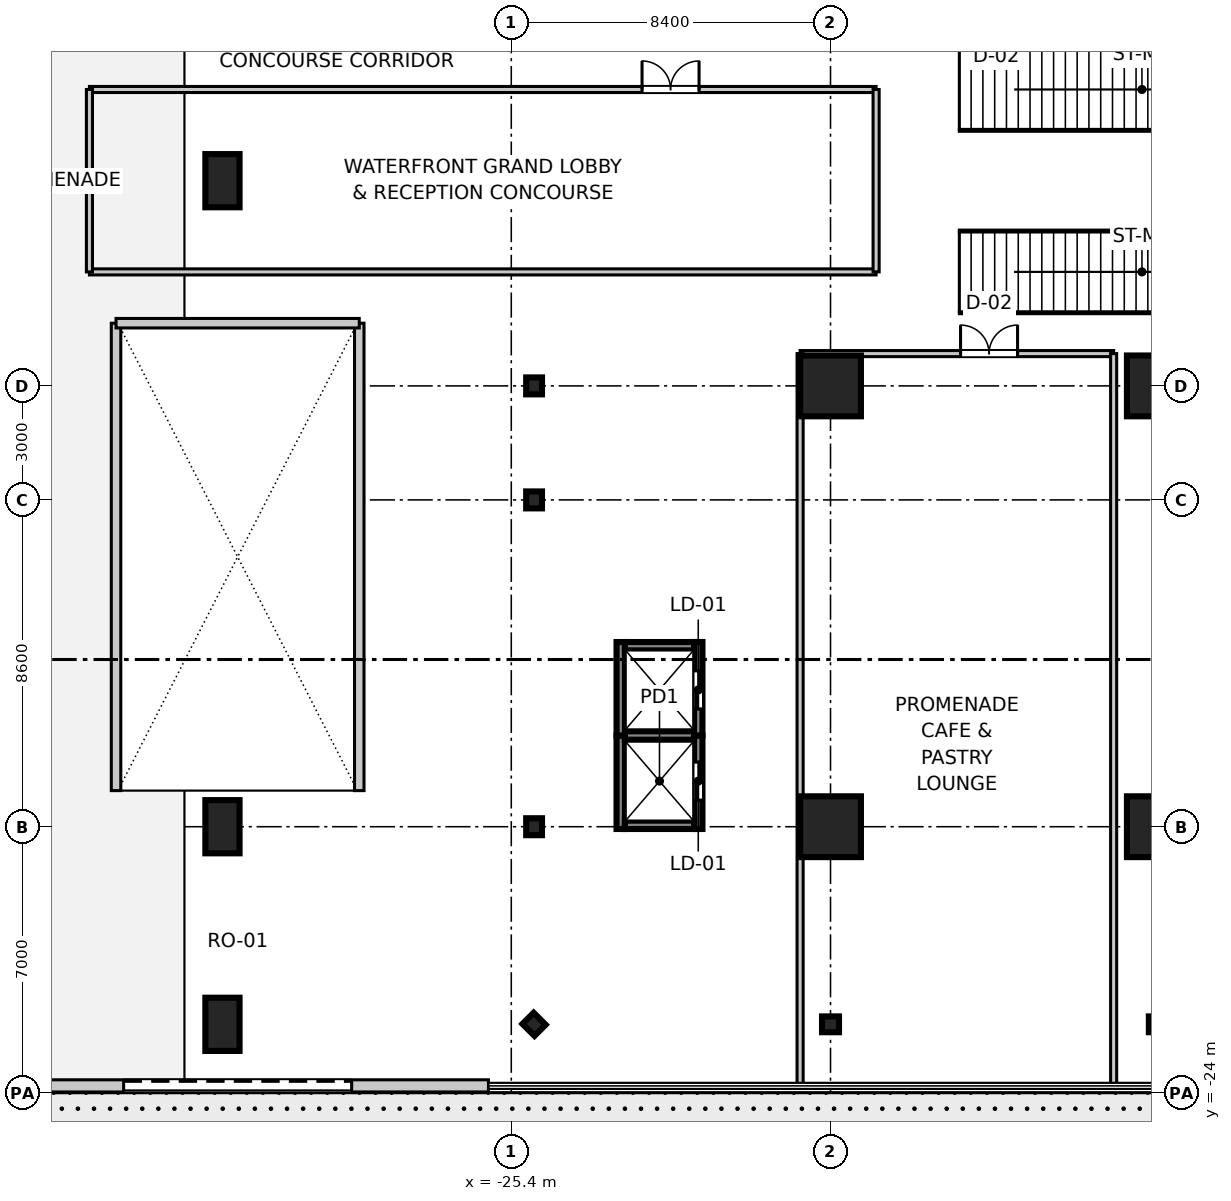
"""IFC4 building model, lengths in metres.
Left out: names, types, materials, properties, quantities, classifications, styles, units other than length and angle.
Written with IfcOpenShell. Run it as: python <this file> out.ifc"""

import sys

from ifc_helpers import new_model, si_unit, direction, frame, frame_2d, origin, origin_2d, place, context, subcontext, project, spatial, rectangle, i_section, extrude, source, transform, mapped, element, fill, save


model = new_model("IFC4")
c1 = context("Model", 3, precision=1e-05, world=origin(), true_north=direction((0.0, 1.0)))
c2 = subcontext(c1, "Body", "Model", "MODEL_VIEW")
j1 = project(units=[si_unit("LENGTHUNIT", "METRE"), si_unit("PLANEANGLEUNIT", "RADIAN")], contexts=[c1])
p1 = place(None, origin())
s1 = spatial("IfcSite", under=j1, at=p1, CompositionType="ELEMENT")
p2 = place(p1, origin())
s2 = spatial("IfcBuilding", under=s1, at=p2, CompositionType="ELEMENT")
p3 = place(p2, origin())
s3 = spatial("IfcBuildingStorey", under=s2, at=p3, CompositionType="ELEMENT", Elevation=0.0)
m1 = source(origin(), c2, "Body", "SweptSolid", [
    extrude(rectangle(XDim=1.6, YDim=1.6, at=origin_2d()), origin(), (0.0, 0.0, 1.0), 5.355),
])
for number, where, z_axis, x_axis in (
    (1, (-17.0, -17.0, 0.0), (0.0, 0.0, 1.0), (1.0, 0.0, 0.0)),
    (2, (-17.0, -5.4, 0.0), (0.0, 0.0, 1.0), (1.0, 0.0, 0.0)),
    (3, (-8.4, -17.0, 0.0), (0.0, 0.0, 1.0), (1.0, 0.0, 0.0)),
    (4, (-8.4, -5.4, 0.0), (0.0, 0.0, 1.0), (1.0, 0.0, 0.0)),
):
    element("IfcColumn", number, at=place(p3, frame(where, z_axis=z_axis, x_axis=x_axis)), inside=s3, PredefinedType="COLUMN", context=c2, shape_type="MappedRepresentation", body=[
        mapped(m1, transform((0.0, 0.0, 0.0), scale=1.0)),
    ])
m2 = source(origin(), c2, "Body", "SweptSolid", [
    extrude(rectangle(XDim=0.9, YDim=1.4, at=origin_2d()), origin(), (0.0, 0.0, 1.0), 5.355),
])
for number, where, z_axis, x_axis in (
    (5, (-33.0, -22.2, 0.0), (0.0, 0.0, 1.0), (1.0, 0.0, 0.0)),
    (6, (-33.0, -17.0, 0.0), (0.0, 0.0, 1.0), (1.0, 0.0, 0.0)),
    (7, (-33.0, 0.0, 0.0), (0.0, 0.0, 1.0), (1.0, 0.0, 0.0)),
):
    element("IfcColumn", number, at=place(p3, frame(where, z_axis=z_axis, x_axis=x_axis)), inside=s3, PredefinedType="PILASTER", context=c2, shape_type="MappedRepresentation", body=[
        mapped(m2, transform((0.0, 0.0, 0.0), scale=1.0)),
    ])
m3 = source(origin(), c2, "Body", "SweptSolid", [
    extrude(i_section(OverallWidth=0.416, OverallDepth=0.446, WebThickness=0.025, FlangeThickness=0.04, at=origin_2d()), origin(), (0.0, 0.0, 1.0), 5.355),
])
for number, where, z_axis, x_axis in (
    (8, (-24.8, -17.0, 0.0), (0.0, 0.0, 1.0), (1.0, 0.0, 0.0)),
    (9, (-24.8, -8.4, 0.0), (0.0, 0.0, 1.0), (1.0, 0.0, 0.0)),
    (10, (-24.8, -5.4, 0.0), (0.0, 0.0, 1.0), (1.0, 0.0, 0.0)),
    (11, (-17.0, -22.2, 0.0), (0.0, 0.0, 1.0), (0.0, 1.0, 0.0)),
    (12, (-8.4, -22.2, 0.0), (0.0, 0.0, 1.0), (0.0, 1.0, 0.0)),
    (13, (-24.8, -22.2, 0.0), (0.0, 0.0, 1.0), (0.707, 0.707, 0.0)),
):
    element("IfcColumn", number, at=place(p3, frame(where, z_axis=z_axis, x_axis=x_axis)), inside=s3, PredefinedType="COLUMN", context=c2, shape_type="MappedRepresentation", body=[
        mapped(m3, transform((0.0, 0.0, 0.0), scale=1.0)),
    ])
m4 = source(origin(), c2, "Body", "SweptSolid", [
    extrude(rectangle(XDim=2.46, YDim=0.22, at=frame_2d((1.23, 0.0))), origin(), (0.0, 0.0, 1.0), 5.08),
])
p4 = place(p3, frame((-22.52, -17.06, 0.0), z_axis=(0.0, 0.0, 1.0), x_axis=(0.0, 1.0, 0.0)))
e14 = element("IfcWall", 14, at=p4, inside=s3, PredefinedType="SHEAR", context=c2, shape_type="MappedRepresentation", body=[
    mapped(m4, transform((0.0, 0.0, 0.0), scale=1.0)),
])
p5 = place(p3, frame((-20.48, -17.06, 0.0), z_axis=(0.0, 0.0, 1.0), x_axis=(0.0, 1.0, 0.0)))
e15 = element("IfcWall", 15, at=p5, inside=s3, PredefinedType="SHEAR", context=c2, shape_type="MappedRepresentation", body=[
    mapped(m4, transform((0.0, 0.0, 0.0), scale=1.0)),
])
p6 = place(p5, frame((0.76, 0.0, 0.0)))
e16 = element("IfcOpeningElement", 16, at=p6, cuts=e15, PredefinedType="OPENING", context=c2, shape_type="SweptSolid", body=[
    extrude(rectangle(XDim=1.0, YDim=2.2, at=frame_2d((0.5, 1.1))), frame((0.0, 0.12, 0.0), z_axis=(0.0, -1.0, 0.0), x_axis=(1.0, 0.0, 0.0)), (0.0, 0.0, 1.0), 0.24),
])
m5 = source(origin(), c2, "Body", "SweptSolid", [
    extrude(rectangle(XDim=1.82, YDim=0.22, at=frame_2d((0.91, 0.0))), origin(), (0.0, 0.0, 1.0), 5.08),
])
p7 = place(p3, frame((-22.41, -16.95, 0.0), z_axis=(0.0, 0.0, 1.0), x_axis=(1.0, 0.0, 0.0)))
e17 = element("IfcWall", 17, at=p7, inside=s3, PredefinedType="SHEAR", context=c2, shape_type="MappedRepresentation", body=[
    mapped(m5, transform((0.0, 0.0, 0.0), scale=1.0)),
])
m6 = source(origin(), c2, "Body", "SweptSolid", [
    extrude(rectangle(XDim=1.82, YDim=0.22, at=frame_2d((0.91, 0.0))), origin(), (0.0, 0.0, 1.0), 5.4),
])
p8 = place(p3, frame((-22.41, -14.6, 0.0), z_axis=(0.0, 0.0, 1.0), x_axis=(1.0, 0.0, 0.0)))
e18 = element("IfcWall", 18, at=p8, inside=s3, PredefinedType="SHEAR", context=c2, shape_type="MappedRepresentation", body=[
    mapped(m6, transform((0.0, 0.0, 0.0), scale=1.0)),
])
m7 = source(origin(), c2, "Body", "SweptSolid", [
    extrude(rectangle(XDim=2.46, YDim=0.22, at=frame_2d((1.23, 0.0))), origin(), (0.0, 0.0, 1.0), 5.08),
])
p9 = place(p3, frame((-22.52, -14.6, 0.0), z_axis=(0.0, 0.0, 1.0), x_axis=(0.0, 1.0, 0.0)))
e19 = element("IfcWall", 19, at=p9, inside=s3, PredefinedType="SHEAR", context=c2, shape_type="MappedRepresentation", body=[
    mapped(m7, transform((0.0, 0.0, 0.0), scale=1.0)),
])
p10 = place(p3, frame((-20.48, -14.6, 0.0), z_axis=(0.0, 0.0, 1.0), x_axis=(0.0, 1.0, 0.0)))
e20 = element("IfcWall", 20, at=p10, inside=s3, PredefinedType="SHEAR", context=c2, shape_type="MappedRepresentation", body=[
    mapped(m7, transform((0.0, 0.0, 0.0), scale=1.0)),
])
p11 = place(p10, frame((0.7, 0.0, 0.0)))
e21 = element("IfcOpeningElement", 21, at=p11, cuts=e20, PredefinedType="OPENING", context=c2, shape_type="SweptSolid", body=[
    extrude(rectangle(XDim=1.0, YDim=2.2, at=frame_2d((0.5, 1.1))), frame((0.0, 0.12, 0.0), z_axis=(0.0, -1.0, 0.0), x_axis=(1.0, 0.0, 0.0)), (0.0, 0.0, 1.0), 0.24),
])
p12 = place(p3, frame((-22.41, -12.25, 0.0), z_axis=(0.0, 0.0, 1.0), x_axis=(1.0, 0.0, 0.0)))
e22 = element("IfcWall", 22, at=p12, inside=s3, PredefinedType="SHEAR", context=c2, shape_type="MappedRepresentation", body=[
    mapped(m5, transform((0.0, 0.0, 0.0), scale=1.0)),
])
m8 = source(origin(), c2, "Body", "SweptSolid", [
    extrude(rectangle(XDim=12.3, YDim=0.25, at=frame_2d((6.15, 0.0))), origin(), (0.0, 0.0, 1.0), 1.3),
])
for number, where, z_axis, x_axis in (
    (23, (-35.8, -16.05, 0.0), (0.0, 0.0, 1.0), (0.0, 1.0, 0.0)),
    (24, (-29.4, -16.05, 0.0), (0.0, 0.0, 1.0), (0.0, 1.0, 0.0)),
):
    element("IfcWall", number, at=place(p3, frame(where, z_axis=z_axis, x_axis=x_axis)), inside=s3, PredefinedType="PARTITIONING", context=c2, shape_type="MappedRepresentation", body=[
        mapped(m8, transform((0.0, 0.0, 0.0), scale=1.0)),
    ])
m9 = source(origin(), c2, "Body", "SweptSolid", [
    extrude(rectangle(XDim=6.4, YDim=0.25, at=frame_2d((3.2, 0.0))), origin(), (0.0, 0.0, 1.0), 1.3),
])
p13 = place(p3, frame((-35.8, -3.75, 0.0), z_axis=(0.0, 0.0, 1.0), x_axis=(1.0, 0.0, 0.0)))
e25 = element("IfcWall", 25, at=p13, inside=s3, PredefinedType="PARTITIONING", context=c2, shape_type="MappedRepresentation", body=[
    mapped(m9, transform((0.0, 0.0, 0.0), scale=1.0)),
])
m10 = source(origin(), c2, "Body", "SweptSolid", [
    extrude(rectangle(XDim=11.82, YDim=0.32, at=frame_2d((5.91, 0.0))), origin(), (0.0, 0.0, 1.0), 5.08),
])
p14 = place(p3, frame((-37.82, -23.82, 0.0), z_axis=(0.0, 0.0, 1.0), x_axis=(1.0, 0.0, 0.0)))
e26 = element("IfcWall", 26, at=p14, inside=s3, PredefinedType="STANDARD", context=c2, shape_type="MappedRepresentation", body=[
    mapped(m10, transform((0.0, 0.0, 0.0), scale=1.0)),
])
p15 = place(p14, frame((2.22, 0.0, 0.0)))
e27 = element("IfcOpeningElement", 27, at=p15, cuts=e26, PredefinedType="OPENING", context=c2, shape_type="SweptSolid", body=[
    extrude(rectangle(XDim=6.0, YDim=3.4, at=frame_2d((3.0, 1.7))), frame((0.0, 0.17, 0.0), z_axis=(0.0, -1.0, 0.0), x_axis=(1.0, 0.0, 0.0)), (0.0, 0.0, 1.0), 0.34),
])
m11 = source(origin(), c2, "Body", "SweptSolid", [
    extrude(rectangle(XDim=20.7, YDim=0.16, at=frame_2d((10.35, 0.0))), origin(), (0.0, 0.0, 1.0), 3.4),
])
p16 = place(p3, frame((-36.5, -2.4, 0.0), z_axis=(0.0, 0.0, 1.0), x_axis=(1.0, 0.0, 0.0)))
e28 = element("IfcWall", 28, at=p16, inside=s3, PredefinedType="PARTITIONING", context=c2, shape_type="MappedRepresentation", body=[
    mapped(m11, transform((0.0, 0.0, 0.0), scale=1.0)),
])
p17 = place(p3, frame((-36.5, 2.4, 0.0), z_axis=(0.0, 0.0, 1.0), x_axis=(1.0, 0.0, 0.0)))
e29 = element("IfcWall", 29, at=p17, inside=s3, PredefinedType="PARTITIONING", context=c2, shape_type="MappedRepresentation", body=[
    mapped(m11, transform((0.0, 0.0, 0.0), scale=1.0)),
])
p18 = place(p17, frame((14.541, 0.0, 0.0)))
e30 = element("IfcOpeningElement", 30, at=p18, cuts=e29, PredefinedType="OPENING", context=c2, shape_type="SweptSolid", body=[
    extrude(rectangle(XDim=1.5, YDim=2.15, at=frame_2d((0.75, 1.075))), frame((0.0, 0.09, 0.0), z_axis=(0.0, -1.0, 0.0), x_axis=(1.0, 0.0, 0.0)), (0.0, 0.0, 1.0), 0.18),
])
m12 = source(origin(), c2, "Body", "SweptSolid", [
    extrude(rectangle(XDim=4.8, YDim=0.16, at=frame_2d((2.4, 0.0))), origin(), (0.0, 0.0, 1.0), 3.4),
])
for number, where, z_axis, x_axis in (
    (31, (-36.5, -2.4, 0.0), (0.0, 0.0, 1.0), (0.0, 1.0, 0.0)),
    (32, (-15.8, -2.4, 0.0), (0.0, 0.0, 1.0), (0.0, 1.0, 0.0)),
):
    element("IfcWall", number, at=place(p3, frame(where, z_axis=z_axis, x_axis=x_axis)), inside=s3, PredefinedType="PARTITIONING", context=c2, shape_type="MappedRepresentation", body=[
        mapped(m12, transform((0.0, 0.0, 0.0), scale=1.0)),
    ])
m13 = source(origin(), c2, "Body", "SweptSolid", [
    extrude(rectangle(XDim=8.25, YDim=0.16, at=frame_2d((4.125, 0.0))), origin(), (0.0, 0.0, 1.0), 3.4),
])
p19 = place(p3, frame((-17.8, -4.55, 0.0), z_axis=(0.0, 0.0, 1.0), x_axis=(1.0, 0.0, 0.0)))
e33 = element("IfcWall", 33, at=p19, inside=s3, PredefinedType="PARTITIONING", context=c2, shape_type="MappedRepresentation", body=[
    mapped(m13, transform((0.0, 0.0, 0.0), scale=1.0)),
])
p20 = place(p19, frame((4.222, 0.0, 0.0)))
e34 = element("IfcOpeningElement", 34, at=p20, cuts=e33, PredefinedType="OPENING", context=c2, shape_type="SweptSolid", body=[
    extrude(rectangle(XDim=1.5, YDim=2.15, at=frame_2d((0.75, 1.075))), frame((0.0, 0.09, 0.0), z_axis=(0.0, -1.0, 0.0), x_axis=(1.0, 0.0, 0.0)), (0.0, 0.0, 1.0), 0.18),
])
m14 = source(origin(), c2, "Body", "SweptSolid", [
    extrude(rectangle(XDim=19.21, YDim=0.16, at=frame_2d((9.605, 0.0))), origin(), (0.0, 0.0, 1.0), 3.4),
])
for number, where, z_axis, x_axis in (
    (35, (-17.8, -23.76, 0.0), (0.0, 0.0, 1.0), (0.0, 1.0, 0.0)),
    (36, (-9.55, -23.76, 0.0), (0.0, 0.0, 1.0), (0.0, 1.0, 0.0)),
):
    element("IfcWall", number, at=place(p3, frame(where, z_axis=z_axis, x_axis=x_axis)), inside=s3, PredefinedType="PARTITIONING", context=c2, shape_type="MappedRepresentation", body=[
        mapped(m14, transform((0.0, 0.0, 0.0), scale=1.0)),
    ])
m15 = source(origin(), c2, "Body", "SweptSolid", [
    extrude(rectangle(XDim=1.0, YDim=2.2, at=frame_2d((0.5, 1.1))), frame((0.0, 0.025, 0.0), z_axis=(0.0, -1.0, 0.0), x_axis=(1.0, 0.0, 0.0)), (0.0, 0.0, 1.0), 0.05),
])
p21 = place(p6, frame((1.0, 0.0, 0.0), z_axis=(0.0, 0.0, 1.0), x_axis=(-1.0, 0.0, 0.0)))
e37 = element("IfcDoor", 37, at=p21, inside=s3, OperationType="DOUBLE_DOOR_SLIDING", PredefinedType="DOOR", context=c2, shape_type="MappedRepresentation", body=[
    mapped(m15, transform((0.0, 0.0, 0.0), scale=1.0)),
])
fill(e16, e37)
p22 = place(p11, frame((1.0, 0.0, 0.0), z_axis=(0.0, 0.0, 1.0), x_axis=(-1.0, 0.0, 0.0)))
e38 = element("IfcDoor", 38, at=p22, inside=s3, OperationType="DOUBLE_DOOR_SLIDING", PredefinedType="DOOR", context=c2, shape_type="MappedRepresentation", body=[
    mapped(m15, transform((0.0, 0.0, 0.0), scale=1.0)),
])
fill(e21, e38)
m16 = source(origin(), c2, "Body", "SweptSolid", [
    extrude(rectangle(XDim=6.0, YDim=3.4, at=frame_2d((3.0, 1.7))), frame((0.0, 0.025, 0.0), z_axis=(0.0, -1.0, 0.0), x_axis=(1.0, 0.0, 0.0)), (0.0, 0.0, 1.0), 0.05),
])
p23 = place(p15, frame((6.0, 0.0, 0.0), z_axis=(0.0, 0.0, 1.0), x_axis=(-1.0, 0.0, 0.0)))
e39 = element("IfcDoor", 39, at=p23, inside=s3, OperationType="ROLLINGUP", PredefinedType="GATE", context=c2, shape_type="MappedRepresentation", body=[
    mapped(m16, transform((0.0, 0.0, 0.0), scale=1.0)),
])
fill(e27, e39)
m17 = source(origin(), c2, "Body", "SweptSolid", [
    extrude(rectangle(XDim=1.5, YDim=2.15, at=frame_2d((0.75, 1.075))), frame((0.0, 0.025, 0.0), z_axis=(0.0, -1.0, 0.0), x_axis=(1.0, 0.0, 0.0)), (0.0, 0.0, 1.0), 0.05),
])
p24 = place(p18, frame((1.5, 0.0, 0.0), z_axis=(0.0, 0.0, 1.0), x_axis=(-1.0, 0.0, 0.0)))
e40 = element("IfcDoor", 40, at=p24, inside=s3, OperationType="DOUBLE_DOOR_SINGLE_SWING", PredefinedType="DOOR", context=c2, shape_type="MappedRepresentation", body=[
    mapped(m17, transform((0.0, 0.0, 0.0), scale=1.0)),
])
fill(e30, e40)
p25 = place(p20, frame((1.5, 0.0, 0.0), z_axis=(0.0, 0.0, 1.0), x_axis=(-1.0, 0.0, 0.0)))
e41 = element("IfcDoor", 41, at=p25, inside=s3, OperationType="DOUBLE_DOOR_SINGLE_SWING", PredefinedType="DOOR", context=c2, shape_type="MappedRepresentation", body=[
    mapped(m17, transform((0.0, 0.0, 0.0), scale=1.0)),
])
fill(e34, e41)
save(model, sys.argv[1])
